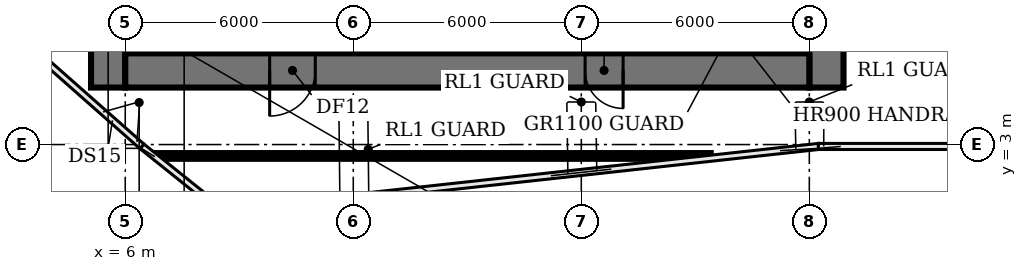
"""IFC4 building model, lengths in metres.
Left out: names, types, materials, properties, quantities, classifications, styles, units other than length and angle.
Written with IfcOpenShell. Run it as: python <this file> out.ifc"""

import sys

from ifc_helpers import new_model, si_unit, direction, frame, frame_2d, origin, place, context, subcontext, project, spatial, rectangle, extrude, element, fill, save


model = new_model("IFC4")
c1 = context("Model", 3, precision=1e-05, world=origin(), true_north=direction((0.0, 1.0)))
c2 = subcontext(c1, "Body", "Model", "MODEL_VIEW")
j1 = project(units=[si_unit("LENGTHUNIT", "METRE"), si_unit("PLANEANGLEUNIT", "RADIAN")], contexts=[c1])
p1 = place(None, origin())
s1 = spatial("IfcSite", under=j1, at=p1, CompositionType="ELEMENT")
p2 = place(p1, origin())
s2 = spatial("IfcBuilding", under=s1, at=p2, CompositionType="ELEMENT")
p3 = place(p2, frame((0.0, 0.0, 79.4)))
s3 = spatial("IfcBuildingStorey", under=s2, at=p3, CompositionType="ELEMENT", Elevation=79.4)
p4 = place(p3, frame((9.275, 11.825, 0.0), z_axis=(0.0, 0.0, 1.0), x_axis=(0.0, -1.0, 0.0)))
e1 = element("IfcWall", 1, at=p4, inside=s3, PredefinedType="SHEAR", context=c2, shape_type="SweptSolid", body=[
    extrude(rectangle(XDim=6.425, YDim=0.25, at=frame_2d((3.212, 0.0))), origin(), (0.0, 0.0, 1.0), 8.05),
])
p5 = place(p4, frame((5.075, 0.0, 0.0)))
e2 = element("IfcOpeningElement", 2, at=p5, cuts=e1, PredefinedType="OPENING", context=c2, shape_type="SweptSolid", body=[
    extrude(rectangle(XDim=1.0, YDim=2.1, at=frame_2d((0.5, 1.05))), frame((0.0, 0.135, 0.0), z_axis=(0.0, -1.0, 0.0), x_axis=(1.0, 0.0, 0.0)), (0.0, 0.0, 1.0), 0.27),
])
p6 = place(p3, frame((13.5, 5.4, 0.0), z_axis=(0.0, 0.0, 1.0), x_axis=(0.0, 1.0, 0.0)))
e3 = element("IfcWall", 3, at=p6, inside=s3, PredefinedType="SHEAR", context=c2, shape_type="SweptSolid", body=[
    extrude(rectangle(XDim=8.2, YDim=0.2, at=frame_2d((4.1, 0.0))), origin(), (0.0, 0.0, 1.0), 8.05),
])
p7 = place(p6, frame((0.75, 0.0, 0.0)))
e4 = element("IfcOpeningElement", 4, at=p7, cuts=e3, PredefinedType="OPENING", context=c2, shape_type="SweptSolid", body=[
    extrude(rectangle(XDim=1.1, YDim=2.1, at=frame_2d((0.55, 1.05))), frame((0.0, 0.11, 0.0), z_axis=(0.0, -1.0, 0.0), x_axis=(1.0, 0.0, 0.0)), (0.0, 0.0, 1.0), 0.22),
])
p8 = place(p6, frame((3.55, 0.0, 0.0)))
e5 = element("IfcOpeningElement", 5, at=p8, cuts=e3, PredefinedType="OPENING", context=c2, shape_type="SweptSolid", body=[
    extrude(rectangle(XDim=1.1, YDim=2.1, at=frame_2d((0.55, 1.05))), frame((0.0, 0.11, 0.0), z_axis=(0.0, -1.0, 0.0), x_axis=(1.0, 0.0, 0.0)), (0.0, 0.0, 1.0), 0.22),
])
p9 = place(p6, frame((6.35, 0.0, 0.0)))
e6 = element("IfcOpeningElement", 6, at=p9, cuts=e3, PredefinedType="OPENING", context=c2, shape_type="SweptSolid", body=[
    extrude(rectangle(XDim=1.1, YDim=2.1, at=frame_2d((0.55, 1.05))), frame((0.0, 0.11, 0.0), z_axis=(0.0, -1.0, 0.0), x_axis=(1.0, 0.0, 0.0)), (0.0, 0.0, 1.0), 0.22),
])
p10 = place(p3, frame((16.5, 5.4, 0.0), z_axis=(0.0, 0.0, 1.0), x_axis=(0.0, 1.0, 0.0)))
e7 = element("IfcWall", 7, at=p10, inside=s3, PredefinedType="SHEAR", context=c2, shape_type="SweptSolid", body=[
    extrude(rectangle(XDim=8.2, YDim=0.2, at=frame_2d((4.1, 0.0))), origin(), (0.0, 0.0, 1.0), 8.05),
])
p11 = place(p3, frame((20.725, 5.4, 0.0), z_axis=(0.0, 0.0, 1.0), x_axis=(0.0, 1.0, 0.0)))
e8 = element("IfcWall", 8, at=p11, inside=s3, PredefinedType="SHEAR", context=c2, shape_type="SweptSolid", body=[
    extrude(rectangle(XDim=6.3, YDim=0.25, at=frame_2d((3.15, 0.0))), origin(), (0.0, 0.0, 1.0), 8.05),
])
p12 = place(p3, frame((5.55, 4.5, 0.0), z_axis=(0.0, 0.0, 1.0), x_axis=(0.0, 1.0, 0.0)))
e9 = element("IfcWall", 9, at=p12, inside=s3, PredefinedType="SHEAR", context=c2, shape_type="SweptSolid", body=[
    extrude(rectangle(XDim=21.2, YDim=0.9, at=frame_2d((10.6, 0.0))), origin(), (0.0, 0.0, 1.0), 8.05),
])
p13 = place(p12, frame((1.15, 0.0, 0.0)))
e10 = element("IfcOpeningElement", 10, at=p13, cuts=e9, PredefinedType="OPENING", context=c2, shape_type="SweptSolid", body=[
    extrude(rectangle(XDim=1.5, YDim=2.1, at=frame_2d((0.75, 1.05))), frame((0.0, 0.46, 0.0), z_axis=(0.0, -1.0, 0.0), x_axis=(1.0, 0.0, 0.0)), (0.0, 0.0, 1.0), 0.92),
])
p14 = place(p12, frame((7.6, 0.0, 0.0)))
e11 = element("IfcOpeningElement", 11, at=p14, cuts=e9, PredefinedType="OPENING", context=c2, shape_type="SweptSolid", body=[
    extrude(rectangle(XDim=1.2, YDim=2.1, at=frame_2d((0.6, 1.05))), frame((0.0, 0.46, 0.0), z_axis=(0.0, -1.0, 0.0), x_axis=(1.0, 0.0, 0.0)), (0.0, 0.0, 1.0), 0.92),
])
p15 = place(p12, frame((14.15, 0.0, 0.0)))
e12 = element("IfcOpeningElement", 12, at=p15, cuts=e9, PredefinedType="OPENING", context=c2, shape_type="SweptSolid", body=[
    extrude(rectangle(XDim=1.2, YDim=2.1, at=frame_2d((0.6, 1.05))), frame((0.0, 0.46, 0.0), z_axis=(0.0, -1.0, 0.0), x_axis=(1.0, 0.0, 0.0)), (0.0, 0.0, 1.0), 0.92),
])
p16 = place(p3, frame((24.45, 25.7, 0.0), z_axis=(0.0, 0.0, 1.0), x_axis=(0.0, -1.0, 0.0)))
e13 = element("IfcWall", 13, at=p16, inside=s3, PredefinedType="SHEAR", context=c2, shape_type="SweptSolid", body=[
    extrude(rectangle(XDim=21.2, YDim=0.9, at=frame_2d((10.6, 0.0))), origin(), (0.0, 0.0, 1.0), 8.05),
])
p17 = place(p16, frame((18.55, 0.0, 0.0)))
e14 = element("IfcOpeningElement", 14, at=p17, cuts=e13, PredefinedType="OPENING", context=c2, shape_type="SweptSolid", body=[
    extrude(rectangle(XDim=1.5, YDim=2.1, at=frame_2d((0.75, 1.05))), frame((0.0, 0.46, 0.0), z_axis=(0.0, -1.0, 0.0), x_axis=(1.0, 0.0, 0.0)), (0.0, 0.0, 1.0), 0.92),
])
p18 = place(p16, frame((12.45, 0.0, 0.0)))
e15 = element("IfcOpeningElement", 15, at=p18, cuts=e13, PredefinedType="OPENING", context=c2, shape_type="SweptSolid", body=[
    extrude(rectangle(XDim=0.9, YDim=2.1, at=frame_2d((0.45, 1.05))), frame((0.0, 0.46, 0.0), z_axis=(0.0, -1.0, 0.0), x_axis=(1.0, 0.0, 0.0)), (0.0, 0.0, 1.0), 0.92),
])
p19 = place(p16, frame((6.45, 0.0, 0.0)))
e16 = element("IfcOpeningElement", 16, at=p19, cuts=e13, PredefinedType="OPENING", context=c2, shape_type="SweptSolid", body=[
    extrude(rectangle(XDim=2.0, YDim=2.1, at=frame_2d((1.0, 1.05))), frame((0.0, 0.46, 0.0), z_axis=(0.0, -1.0, 0.0), x_axis=(1.0, 0.0, 0.0)), (0.0, 0.0, 1.0), 0.92),
])
p20 = place(p3, frame((24.0, 4.95, 0.0), z_axis=(0.0, 0.0, 1.0), x_axis=(-1.0, 0.0, 0.0)))
e17 = element("IfcWall", 17, at=p20, inside=s3, PredefinedType="SHEAR", context=c2, shape_type="SweptSolid", body=[
    extrude(rectangle(XDim=18.0, YDim=0.9, at=frame_2d((9.0, 0.0))), origin(), (0.0, 0.0, 1.0), 8.05),
])
p21 = place(p20, frame((13.0, 0.0, 0.0)))
e18 = element("IfcOpeningElement", 18, at=p21, cuts=e17, PredefinedType="OPENING", context=c2, shape_type="SweptSolid", body=[
    extrude(rectangle(XDim=1.2, YDim=2.1, at=frame_2d((0.6, 1.05))), frame((0.0, 0.46, 0.0), z_axis=(0.0, -1.0, 0.0), x_axis=(1.0, 0.0, 0.0)), (0.0, 0.0, 1.0), 0.92),
])
p22 = place(p20, frame((4.9, 0.0, 0.0)))
e19 = element("IfcOpeningElement", 19, at=p22, cuts=e17, PredefinedType="OPENING", context=c2, shape_type="SweptSolid", body=[
    extrude(rectangle(XDim=1.0, YDim=2.1, at=frame_2d((0.5, 1.05))), frame((0.0, 0.46, 0.0), z_axis=(0.0, -1.0, 0.0), x_axis=(1.0, 0.0, 0.0)), (0.0, 0.0, 1.0), 0.92),
])
p23 = place(p3, frame((6.83, 2.7, 0.0), z_axis=(0.0, 0.0, 1.0), x_axis=(1.0, 0.0, 0.0)))
e20 = element("IfcWall", 20, at=p23, inside=s3, PredefinedType="PARTITIONING", context=c2, shape_type="SweptSolid", body=[
    extrude(rectangle(XDim=14.575, YDim=0.15, at=frame_2d((7.288, 0.0))), origin(), (0.0, 0.0, 1.0), 6.33),
])
p24 = place(p21, origin())
e21 = element("IfcDoor", 21, at=p24, inside=s3, OperationType="SINGLE_SWING_RIGHT", PredefinedType="DOOR", context=c2, shape_type="SweptSolid", body=[
    extrude(rectangle(XDim=1.2, YDim=2.1, at=frame_2d((0.6, 1.05))), frame((0.0, 0.025, 0.0), z_axis=(0.0, -1.0, 0.0), x_axis=(1.0, 0.0, 0.0)), (0.0, 0.0, 1.0), 0.05),
])
fill(e18, e21)
p25 = place(p22, origin())
e22 = element("IfcDoor", 22, at=p25, inside=s3, OperationType="SINGLE_SWING_LEFT", PredefinedType="DOOR", context=c2, shape_type="SweptSolid", body=[
    extrude(rectangle(XDim=1.0, YDim=2.1, at=frame_2d((0.5, 1.05))), frame((0.0, -0.39, 0.0), z_axis=(0.0, -1.0, 0.0), x_axis=(1.0, 0.0, 0.0)), (0.0, 0.0, 1.0), 0.05),
])
fill(e19, e22)
save(model, sys.argv[1])
